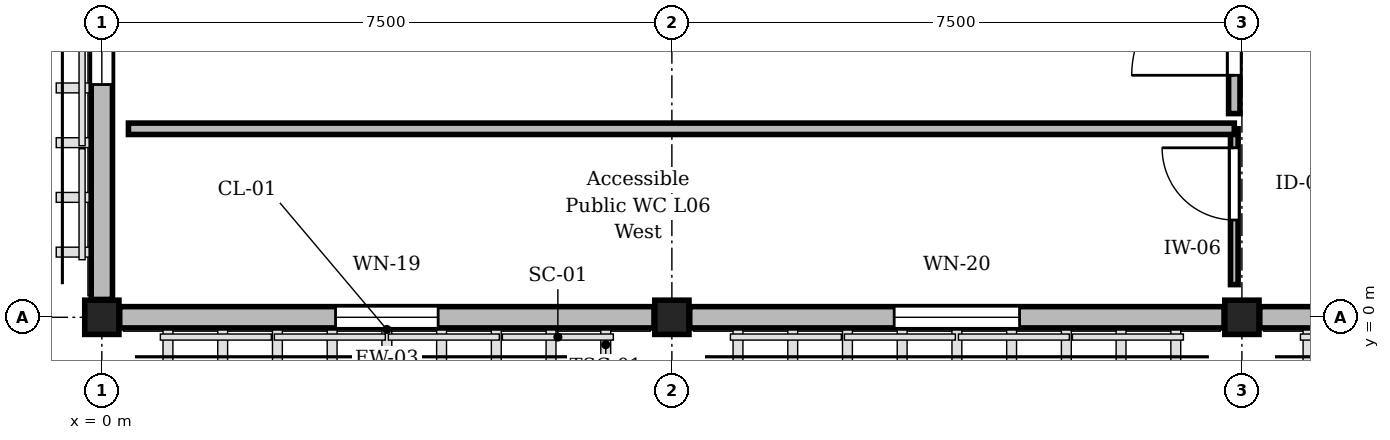
"""IFC4 building model, lengths in metres.
Left out: names, types, materials, properties, quantities, classifications, styles, units other than length and angle.
Written with IfcOpenShell. Run it as: python <this file> out.ifc"""

import sys

from ifc_helpers import new_model, si_unit, direction, frame, frame_2d, origin, origin_2d, place, context, subcontext, project, spatial, rectangle, extrude, element, fill, save


model = new_model("IFC4")
c1 = context("Model", 3, precision=1e-05, world=origin(), true_north=direction((0.0, 1.0)))
c2 = subcontext(c1, "Body", "Model", "MODEL_VIEW")
j1 = project(units=[si_unit("LENGTHUNIT", "METRE"), si_unit("PLANEANGLEUNIT", "RADIAN")], contexts=[c1])
p1 = place(None, origin())
s1 = spatial("IfcSite", under=j1, at=p1, CompositionType="ELEMENT")
p2 = place(p1, origin())
s2 = spatial("IfcBuilding", under=s1, at=p2, CompositionType="ELEMENT")
p3 = place(p2, frame((0.0, 0.0, 25.95)))
s3 = spatial("IfcBuildingStorey", under=s2, at=p3, CompositionType="ELEMENT", Elevation=25.95)
for number, where, z_axis, x_axis in (
    (1, (0.0, 0.0, 0.0), (0.0, 0.0, 1.0), (1.0, 0.0, 0.0)),
    (2, (7.5, 0.0, 0.0), (0.0, 0.0, 1.0), (1.0, 0.0, 0.0)),
    (3, (15.0, 0.0, 0.0), (0.0, 0.0, 1.0), (1.0, 0.0, 0.0)),
):
    element("IfcColumn", number, at=place(p3, frame(where, z_axis=z_axis, x_axis=x_axis)), inside=s3, PredefinedType="COLUMN", context=c2, shape_type="SweptSolid", body=[
        extrude(rectangle(XDim=0.45, YDim=0.45, at=origin_2d()), origin(), (0.0, 0.0, 1.0), 4.05),
    ])
p4 = place(p3, frame((7.265, 0.0, 0.0), z_axis=(0.0, 0.0, 1.0), x_axis=(-1.0, 0.0, 0.0)))
e4 = element("IfcWall", 4, at=p4, inside=s3, PredefinedType="STANDARD", context=c2, shape_type="SweptSolid", body=[
    extrude(rectangle(XDim=7.03, YDim=0.28, at=frame_2d((3.515, 0.0))), origin(), (0.0, 0.0, 1.0), 3.17),
])
p5 = place(p4, frame((2.84, 0.0, 0.85)))
e5 = element("IfcOpeningElement", 5, at=p5, cuts=e4, PredefinedType="OPENING", context=c2, shape_type="SweptSolid", body=[
    extrude(rectangle(XDim=1.35, YDim=2.04, at=frame_2d((0.675, 1.02))), frame((0.0, 0.15, 0.0), z_axis=(0.0, -1.0, 0.0), x_axis=(1.0, 0.0, 0.0)), (0.0, 0.0, 1.0), 0.3),
])
p6 = place(p3, frame((0.0, 0.235, 0.0), z_axis=(0.0, 0.0, 1.0), x_axis=(0.0, 1.0, 0.0)))
e6 = element("IfcWall", 6, at=p6, inside=s3, PredefinedType="STANDARD", context=c2, shape_type="SweptSolid", body=[
    extrude(rectangle(XDim=7.005, YDim=0.28, at=frame_2d((3.502, 0.0))), origin(), (0.0, 0.0, 1.0), 3.17),
])
p7 = place(p6, frame((2.827, 0.0, 0.85)))
e7 = element("IfcOpeningElement", 7, at=p7, cuts=e6, PredefinedType="OPENING", context=c2, shape_type="SweptSolid", body=[
    extrude(rectangle(XDim=1.35, YDim=2.04, at=frame_2d((0.675, 1.02))), frame((0.0, 0.15, 0.0), z_axis=(0.0, -1.0, 0.0), x_axis=(1.0, 0.0, 0.0)), (0.0, 0.0, 1.0), 0.3),
])
p8 = place(p3, frame((14.765, 0.0, 0.0), z_axis=(0.0, 0.0, 1.0), x_axis=(-1.0, 0.0, 0.0)))
e8 = element("IfcWall", 8, at=p8, inside=s3, PredefinedType="STANDARD", context=c2, shape_type="SweptSolid", body=[
    extrude(rectangle(XDim=7.03, YDim=0.28, at=frame_2d((3.515, 0.0))), origin(), (0.0, 0.0, 1.0), 3.17),
])
p9 = place(p8, frame((2.69, 0.0, 0.85)))
e9 = element("IfcOpeningElement", 9, at=p9, cuts=e8, PredefinedType="OPENING", context=c2, shape_type="SweptSolid", body=[
    extrude(rectangle(XDim=1.65, YDim=2.04, at=frame_2d((0.825, 1.02))), frame((0.0, 0.15, 0.0), z_axis=(0.0, -1.0, 0.0), x_axis=(1.0, 0.0, 0.0)), (0.0, 0.0, 1.0), 0.3),
])
p10 = place(p3, frame((22.265, 0.0, 0.0), z_axis=(0.0, 0.0, 1.0), x_axis=(-1.0, 0.0, 0.0)))
e10 = element("IfcWall", 10, at=p10, inside=s3, PredefinedType="STANDARD", context=c2, shape_type="SweptSolid", body=[
    extrude(rectangle(XDim=7.03, YDim=0.28, at=frame_2d((3.515, 0.0))), origin(), (0.0, 0.0, 1.0), 3.17),
])
p11 = place(p10, frame((2.84, 0.0, 0.85)))
e11 = element("IfcOpeningElement", 11, at=p11, cuts=e10, PredefinedType="OPENING", context=c2, shape_type="SweptSolid", body=[
    extrude(rectangle(XDim=1.35, YDim=2.04, at=frame_2d((0.675, 1.02))), frame((0.0, 0.15, 0.0), z_axis=(0.0, -1.0, 0.0), x_axis=(1.0, 0.0, 0.0)), (0.0, 0.0, 1.0), 0.3),
])
p12 = place(p3, frame((14.9, 0.43, 0.0), z_axis=(0.0, 0.0, 1.0), x_axis=(0.0, 1.0, 0.0)))
e12 = element("IfcWall", 12, at=p12, inside=s3, PredefinedType="PARTITIONING", context=c2, shape_type="SweptSolid", body=[
    extrude(rectangle(XDim=2.05, YDim=0.1, at=frame_2d((1.025, 0.0))), origin(), (0.0, 0.0, 1.0), 3.205),
])
p13 = place(p12, frame((0.85, 0.0, 0.0)))
e13 = element("IfcOpeningElement", 13, at=p13, cuts=e12, PredefinedType="OPENING", context=c2, shape_type="SweptSolid", body=[
    extrude(rectangle(XDim=0.95, YDim=2.15, at=frame_2d((0.475, 1.075))), frame((0.0, 0.06, 0.0), z_axis=(0.0, -1.0, 0.0), x_axis=(1.0, 0.0, 0.0)), (0.0, 0.0, 1.0), 0.12),
])
p14 = place(p3, frame((14.9, 2.68, 0.0), z_axis=(0.0, 0.0, 1.0), x_axis=(0.0, 1.0, 0.0)))
e14 = element("IfcWall", 14, at=p14, inside=s3, PredefinedType="PARTITIONING", context=c2, shape_type="SweptSolid", body=[
    extrude(rectangle(XDim=4.39, YDim=0.15, at=frame_2d((2.195, 0.0))), origin(), (0.0, 0.0, 1.0), 3.205),
])
p15 = place(p14, frame((0.504, 0.0, 0.0)))
e15 = element("IfcOpeningElement", 15, at=p15, cuts=e14, PredefinedType="OPENING", context=c2, shape_type="SweptSolid", body=[
    extrude(rectangle(XDim=1.35, YDim=2.25, at=frame_2d((0.675, 1.125))), frame((0.0, 0.085, 0.0), z_axis=(0.0, -1.0, 0.0), x_axis=(1.0, 0.0, 0.0)), (0.0, 0.0, 1.0), 0.17),
])
p16 = place(p3, frame((0.35, 2.48, 0.0), z_axis=(0.0, 0.0, 1.0), x_axis=(1.0, 0.0, 0.0)))
e16 = element("IfcWall", 16, at=p16, inside=s3, PredefinedType="PARTITIONING", context=c2, shape_type="SweptSolid", body=[
    extrude(rectangle(XDim=14.55, YDim=0.15, at=frame_2d((7.275, 0.0))), origin(), (0.0, 0.0, 1.0), 3.755),
])
p17 = place(p5, origin())
e17 = element("IfcWindow", 17, at=p17, inside=s3, PartitioningType="SINGLE_PANEL", PredefinedType="WINDOW", context=c2, shape_type="SweptSolid", body=[
    extrude(rectangle(XDim=1.35, YDim=2.04, at=frame_2d((0.675, 1.02))), frame((0.0, 0.03, 0.0), z_axis=(0.0, -1.0, 0.0), x_axis=(1.0, 0.0, 0.0)), (0.0, 0.0, 1.0), 0.06),
])
fill(e5, e17)
p18 = place(p7, origin())
e18 = element("IfcWindow", 18, at=p18, inside=s3, PartitioningType="SINGLE_PANEL", PredefinedType="WINDOW", context=c2, shape_type="SweptSolid", body=[
    extrude(rectangle(XDim=1.35, YDim=2.04, at=frame_2d((0.675, 1.02))), frame((0.0, 0.03, 0.0), z_axis=(0.0, -1.0, 0.0), x_axis=(1.0, 0.0, 0.0)), (0.0, 0.0, 1.0), 0.06),
])
fill(e7, e18)
p19 = place(p9, origin())
e19 = element("IfcWindow", 19, at=p19, inside=s3, PartitioningType="SINGLE_PANEL", PredefinedType="WINDOW", context=c2, shape_type="SweptSolid", body=[
    extrude(rectangle(XDim=1.65, YDim=2.04, at=frame_2d((0.825, 1.02))), frame((0.0, 0.03, 0.0), z_axis=(0.0, -1.0, 0.0), x_axis=(1.0, 0.0, 0.0)), (0.0, 0.0, 1.0), 0.06),
])
fill(e9, e19)
p20 = place(p13, origin())
e20 = element("IfcDoor", 20, at=p20, inside=s3, OperationType="SINGLE_SWING_RIGHT", PredefinedType="DOOR", context=c2, shape_type="SweptSolid", body=[
    extrude(rectangle(XDim=0.95, YDim=2.15, at=frame_2d((0.475, 1.075))), frame((0.0, 0.025, 0.0), z_axis=(0.0, -1.0, 0.0), x_axis=(1.0, 0.0, 0.0)), (0.0, 0.0, 1.0), 0.05),
])
fill(e13, e20)
p21 = place(p15, origin())
e21 = element("IfcDoor", 21, at=p21, inside=s3, OperationType="SINGLE_SWING_LEFT", PredefinedType="DOOR", context=c2, shape_type="SweptSolid", body=[
    extrude(rectangle(XDim=1.35, YDim=2.25, at=frame_2d((0.675, 1.125))), frame((0.0, 0.025, 0.0), z_axis=(0.0, -1.0, 0.0), x_axis=(1.0, 0.0, 0.0)), (0.0, 0.0, 1.0), 0.05),
])
fill(e15, e21)
save(model, sys.argv[1])
